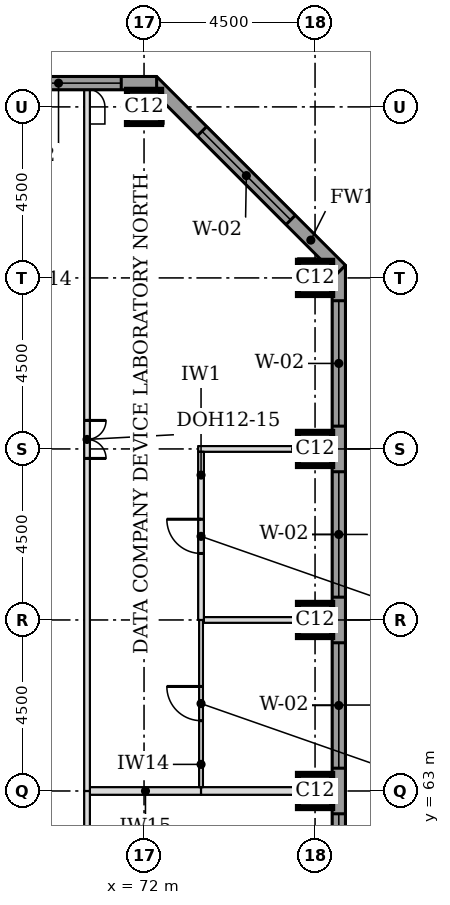
"""IFC4 building model, lengths in metres.
Left out: names, types, materials, properties, quantities, classifications, styles, units other than length and angle.
Written with IfcOpenShell. Run it as: python <this file> out.ifc"""

import sys

from ifc_helpers import new_model, si_unit, direction, frame, frame_2d, origin, origin_2d, place, context, subcontext, project, spatial, rectangle, extrude, element, fill, save


model = new_model("IFC4")
c1 = context("Model", 3, precision=1e-05, world=origin(), true_north=direction((0.0, 1.0)))
c2 = subcontext(c1, "Body", "Model", "MODEL_VIEW")
j1 = project(units=[si_unit("LENGTHUNIT", "METRE"), si_unit("PLANEANGLEUNIT", "RADIAN")], contexts=[c1])
p1 = place(None, origin())
s1 = spatial("IfcSite", under=j1, at=p1, CompositionType="ELEMENT")
p2 = place(p1, origin())
s2 = spatial("IfcBuilding", under=s1, at=p2, CompositionType="ELEMENT")
p3 = place(p2, frame((0.0, 0.0, 248.9)))
s3 = spatial("IfcBuildingStorey", under=s2, at=p3, CompositionType="ELEMENT", Elevation=248.9)
for number, where, z_axis, x_axis in (
    (1, (76.5, 63.0, 0.0), (0.0, 0.0, 1.0), (1.0, 0.0, 0.0)),
    (2, (76.5, 67.5, 0.0), (0.0, 0.0, 1.0), (1.0, 0.0, 0.0)),
    (3, (76.5, 72.0, 0.0), (0.0, 0.0, 1.0), (1.0, 0.0, 0.0)),
    (4, (76.5, 76.5, 0.0), (0.0, 0.0, 1.0), (1.0, 0.0, 0.0)),
    (5, (72.0, 81.0, 0.0), (0.0, 0.0, 1.0), (1.0, 0.0, 0.0)),
):
    element("IfcColumn", number, at=place(p3, frame(where, z_axis=z_axis, x_axis=x_axis)), inside=s3, PredefinedType="COLUMN", context=c2, shape_type="SweptSolid", body=[
        extrude(rectangle(XDim=0.9, YDim=0.9, at=origin_2d()), origin(), (0.0, 0.0, 1.0), 3.7),
    ])
p4 = place(p3, frame((77.125, 44.669, 0.0), z_axis=(0.0, 0.0, 1.0), x_axis=(0.0, 1.0, 0.0)))
e6 = element("IfcWall", 6, at=p4, inside=s3, PredefinedType="STANDARD", context=c2, shape_type="SweptSolid", body=[
    extrude(rectangle(XDim=32.163, YDim=0.35, at=frame_2d((16.081, 0.0))), origin(), (0.0, 0.0, 1.0), 3.525),
])
p5 = place(p4, frame((0.931, 0.0, 0.9)))
e7 = element("IfcOpeningElement", 7, at=p5, cuts=e6, PredefinedType="OPENING", context=c2, shape_type="SweptSolid", body=[
    extrude(rectangle(XDim=3.3, YDim=1.9, at=frame_2d((1.65, 0.95))), frame((0.0, 0.185, 0.0), z_axis=(0.0, -1.0, 0.0), x_axis=(1.0, 0.0, 0.0)), (0.0, 0.0, 1.0), 0.37),
])
p6 = place(p4, frame((5.431, 0.0, 0.9)))
e8 = element("IfcOpeningElement", 8, at=p6, cuts=e6, PredefinedType="OPENING", context=c2, shape_type="SweptSolid", body=[
    extrude(rectangle(XDim=3.3, YDim=1.9, at=frame_2d((1.65, 0.95))), frame((0.0, 0.185, 0.0), z_axis=(0.0, -1.0, 0.0), x_axis=(1.0, 0.0, 0.0)), (0.0, 0.0, 1.0), 0.37),
])
p7 = place(p4, frame((9.931, 0.0, 0.9)))
e9 = element("IfcOpeningElement", 9, at=p7, cuts=e6, PredefinedType="OPENING", context=c2, shape_type="SweptSolid", body=[
    extrude(rectangle(XDim=3.3, YDim=1.9, at=frame_2d((1.65, 0.95))), frame((0.0, 0.185, 0.0), z_axis=(0.0, -1.0, 0.0), x_axis=(1.0, 0.0, 0.0)), (0.0, 0.0, 1.0), 0.37),
])
p8 = place(p4, frame((14.431, 0.0, 0.9)))
e10 = element("IfcOpeningElement", 10, at=p8, cuts=e6, PredefinedType="OPENING", context=c2, shape_type="SweptSolid", body=[
    extrude(rectangle(XDim=3.3, YDim=1.9, at=frame_2d((1.65, 0.95))), frame((0.0, 0.185, 0.0), z_axis=(0.0, -1.0, 0.0), x_axis=(1.0, 0.0, 0.0)), (0.0, 0.0, 1.0), 0.37),
])
p9 = place(p4, frame((18.931, 0.0, 0.9)))
e11 = element("IfcOpeningElement", 11, at=p9, cuts=e6, PredefinedType="OPENING", context=c2, shape_type="SweptSolid", body=[
    extrude(rectangle(XDim=3.3, YDim=1.9, at=frame_2d((1.65, 0.95))), frame((0.0, 0.185, 0.0), z_axis=(0.0, -1.0, 0.0), x_axis=(1.0, 0.0, 0.0)), (0.0, 0.0, 1.0), 0.37),
])
p10 = place(p4, frame((23.431, 0.0, 0.9)))
e12 = element("IfcOpeningElement", 12, at=p10, cuts=e6, PredefinedType="OPENING", context=c2, shape_type="SweptSolid", body=[
    extrude(rectangle(XDim=3.3, YDim=1.9, at=frame_2d((1.65, 0.95))), frame((0.0, 0.185, 0.0), z_axis=(0.0, -1.0, 0.0), x_axis=(1.0, 0.0, 0.0)), (0.0, 0.0, 1.0), 0.37),
])
p11 = place(p4, frame((27.931, 0.0, 0.9)))
e13 = element("IfcOpeningElement", 13, at=p11, cuts=e6, PredefinedType="OPENING", context=c2, shape_type="SweptSolid", body=[
    extrude(rectangle(XDim=3.3, YDim=1.9, at=frame_2d((1.65, 0.95))), frame((0.0, 0.185, 0.0), z_axis=(0.0, -1.0, 0.0), x_axis=(1.0, 0.0, 0.0)), (0.0, 0.0, 1.0), 0.37),
])
p12 = place(p3, frame((77.176, 76.708, 0.0), z_axis=(0.0, 0.0, 1.0), x_axis=(-0.707106781187, 0.707106781187, 0.0)))
e14 = element("IfcWall", 14, at=p12, inside=s3, PredefinedType="STANDARD", context=c2, shape_type="SweptSolid", body=[
    extrude(rectangle(XDim=7.027, YDim=0.35, at=frame_2d((3.513, 0.0))), origin(), (0.0, 0.0, 1.0), 3.525),
])
p13 = place(p12, frame((1.863, 0.0, 0.9)))
e15 = element("IfcOpeningElement", 15, at=p13, cuts=e14, PredefinedType="OPENING", context=c2, shape_type="SweptSolid", body=[
    extrude(rectangle(XDim=3.3, YDim=1.9, at=frame_2d((1.65, 0.95))), frame((0.0, 0.185, 0.0), z_axis=(0.0, -1.0, 0.0), x_axis=(1.0, 0.0, 0.0)), (0.0, 0.0, 1.0), 0.37),
])
p14 = place(p3, frame((72.331, 81.625, 0.0), z_axis=(0.0, 0.0, 1.0), x_axis=(-1.0, 0.0, 0.0)))
e16 = element("IfcWall", 16, at=p14, inside=s3, PredefinedType="STANDARD", context=c2, shape_type="SweptSolid", body=[
    extrude(rectangle(XDim=32.163, YDim=0.35, at=frame_2d((16.081, 0.0))), origin(), (0.0, 0.0, 1.0), 3.525),
])
p15 = place(p14, frame((0.931, 0.0, 0.9)))
e17 = element("IfcOpeningElement", 17, at=p15, cuts=e16, PredefinedType="OPENING", context=c2, shape_type="SweptSolid", body=[
    extrude(rectangle(XDim=3.3, YDim=1.9, at=frame_2d((1.65, 0.95))), frame((0.0, 0.185, 0.0), z_axis=(0.0, -1.0, 0.0), x_axis=(1.0, 0.0, 0.0)), (0.0, 0.0, 1.0), 0.37),
])
p16 = place(p14, frame((5.431, 0.0, 0.9)))
e18 = element("IfcOpeningElement", 18, at=p16, cuts=e16, PredefinedType="OPENING", context=c2, shape_type="SweptSolid", body=[
    extrude(rectangle(XDim=3.3, YDim=1.9, at=frame_2d((1.65, 0.95))), frame((0.0, 0.185, 0.0), z_axis=(0.0, -1.0, 0.0), x_axis=(1.0, 0.0, 0.0)), (0.0, 0.0, 1.0), 0.37),
])
p17 = place(p14, frame((9.931, 0.0, 0.9)))
e19 = element("IfcOpeningElement", 19, at=p17, cuts=e16, PredefinedType="OPENING", context=c2, shape_type="SweptSolid", body=[
    extrude(rectangle(XDim=3.3, YDim=1.9, at=frame_2d((1.65, 0.95))), frame((0.0, 0.185, 0.0), z_axis=(0.0, -1.0, 0.0), x_axis=(1.0, 0.0, 0.0)), (0.0, 0.0, 1.0), 0.37),
])
p18 = place(p14, frame((14.431, 0.0, 0.9)))
e20 = element("IfcOpeningElement", 20, at=p18, cuts=e16, PredefinedType="OPENING", context=c2, shape_type="SweptSolid", body=[
    extrude(rectangle(XDim=3.3, YDim=1.9, at=frame_2d((1.65, 0.95))), frame((0.0, 0.185, 0.0), z_axis=(0.0, -1.0, 0.0), x_axis=(1.0, 0.0, 0.0)), (0.0, 0.0, 1.0), 0.37),
])
p19 = place(p14, frame((18.931, 0.0, 0.9)))
e21 = element("IfcOpeningElement", 21, at=p19, cuts=e16, PredefinedType="OPENING", context=c2, shape_type="SweptSolid", body=[
    extrude(rectangle(XDim=3.3, YDim=1.9, at=frame_2d((1.65, 0.95))), frame((0.0, 0.185, 0.0), z_axis=(0.0, -1.0, 0.0), x_axis=(1.0, 0.0, 0.0)), (0.0, 0.0, 1.0), 0.37),
])
p20 = place(p14, frame((23.431, 0.0, 0.9)))
e22 = element("IfcOpeningElement", 22, at=p20, cuts=e16, PredefinedType="OPENING", context=c2, shape_type="SweptSolid", body=[
    extrude(rectangle(XDim=3.3, YDim=1.9, at=frame_2d((1.65, 0.95))), frame((0.0, 0.185, 0.0), z_axis=(0.0, -1.0, 0.0), x_axis=(1.0, 0.0, 0.0)), (0.0, 0.0, 1.0), 0.37),
])
p21 = place(p14, frame((27.931, 0.0, 0.9)))
e23 = element("IfcOpeningElement", 23, at=p21, cuts=e16, PredefinedType="OPENING", context=c2, shape_type="SweptSolid", body=[
    extrude(rectangle(XDim=3.3, YDim=1.9, at=frame_2d((1.65, 0.95))), frame((0.0, 0.185, 0.0), z_axis=(0.0, -1.0, 0.0), x_axis=(1.0, 0.0, 0.0)), (0.0, 0.0, 1.0), 0.37),
])
p22 = place(p3, frame((70.575, 63.0, 0.0), z_axis=(0.0, 0.0, 1.0), x_axis=(1.0, 0.0, 0.0)))
e24 = element("IfcWall", 24, at=p22, inside=s3, PredefinedType="PARTITIONING", context=c2, shape_type="SweptSolid", body=[
    extrude(rectangle(XDim=2.925, YDim=0.2, at=frame_2d((1.462, 0.0))), origin(), (0.0, 0.0, 1.0), 3.55),
])
p23 = place(p3, frame((73.5, 63.0, 0.0), z_axis=(0.0, 0.0, 1.0), x_axis=(1.0, 0.0, 0.0)))
e25 = element("IfcWall", 25, at=p23, inside=s3, PredefinedType="PARTITIONING", context=c2, shape_type="SweptSolid", body=[
    extrude(rectangle(XDim=3.45, YDim=0.2, at=frame_2d((1.725, 0.0))), origin(), (0.0, 0.0, 1.0), 3.55),
])
p24 = place(p3, frame((73.575, 67.5, 0.0), z_axis=(0.0, 0.0, 1.0), x_axis=(1.0, 0.0, 0.0)))
e26 = element("IfcWall", 26, at=p24, inside=s3, PredefinedType="PARTITIONING", context=c2, shape_type="SweptSolid", body=[
    extrude(rectangle(XDim=3.375, YDim=0.15, at=frame_2d((1.688, 0.0))), origin(), (0.0, 0.0, 1.0), 3.55),
])
p25 = place(p3, frame((73.425, 72.0, 0.0), z_axis=(0.0, 0.0, 1.0), x_axis=(1.0, 0.0, 0.0)))
e27 = element("IfcWall", 27, at=p25, inside=s3, PredefinedType="PARTITIONING", context=c2, shape_type="SweptSolid", body=[
    extrude(rectangle(XDim=3.525, YDim=0.15, at=frame_2d((1.762, 0.0))), origin(), (0.0, 0.0, 1.0), 3.55),
])
p26 = place(p3, frame((70.5, 45.0, 0.0), z_axis=(0.0, 0.0, 1.0), x_axis=(0.0, 1.0, 0.0)))
e28 = element("IfcWall", 28, at=p26, inside=s3, PredefinedType="PARTITIONING", context=c2, shape_type="SweptSolid", body=[
    extrude(rectangle(XDim=18.0, YDim=0.15, at=frame_2d((9.0, 0.0))), origin(), (0.0, 0.0, 1.0), 3.55),
])
p27 = place(p26, frame((8.5, 0.0, 0.0)))
e29 = element("IfcOpeningElement", 29, at=p27, cuts=e28, PredefinedType="OPENING", context=c2, shape_type="SweptSolid", body=[
    extrude(rectangle(XDim=1.0, YDim=2.1, at=frame_2d((0.5, 1.05))), frame((0.0, 0.085, 0.0), z_axis=(0.0, -1.0, 0.0), x_axis=(1.0, 0.0, 0.0)), (0.0, 0.0, 1.0), 0.17),
])
p28 = place(p3, frame((70.5, 63.0, 0.0), z_axis=(0.0, 0.0, 1.0), x_axis=(0.0, 1.0, 0.0)))
e30 = element("IfcWall", 30, at=p28, inside=s3, PredefinedType="PARTITIONING", context=c2, shape_type="SweptSolid", body=[
    extrude(rectangle(XDim=18.45, YDim=0.15, at=frame_2d((9.225, 0.0))), origin(), (0.0, 0.0, 1.0), 3.55),
])
p29 = place(p28, frame((8.75, 0.0, 0.0)))
e31 = element("IfcOpeningElement", 31, at=p29, cuts=e30, PredefinedType="OPENING", context=c2, shape_type="SweptSolid", body=[
    extrude(rectangle(XDim=1.0, YDim=2.1, at=frame_2d((0.5, 1.05))), frame((0.0, 0.085, 0.0), z_axis=(0.0, -1.0, 0.0), x_axis=(1.0, 0.0, 0.0)), (0.0, 0.0, 1.0), 0.17),
])
p30 = place(p3, frame((73.5, 63.1, 0.0), z_axis=(0.0, 0.0, 1.0), x_axis=(0.0, 1.0, 0.0)))
e32 = element("IfcWall", 32, at=p30, inside=s3, PredefinedType="PARTITIONING", context=c2, shape_type="SweptSolid", body=[
    extrude(rectangle(XDim=4.4, YDim=0.1, at=frame_2d((2.2, 0.0))), origin(), (0.0, 0.0, 1.0), 3.55),
])
p31 = place(p30, frame((1.75, 0.0, 0.0)))
e33 = element("IfcOpeningElement", 33, at=p31, cuts=e32, PredefinedType="OPENING", context=c2, shape_type="SweptSolid", body=[
    extrude(rectangle(XDim=0.9, YDim=2.1, at=frame_2d((0.45, 1.05))), frame((0.0, 0.06, 0.0), z_axis=(0.0, -1.0, 0.0), x_axis=(1.0, 0.0, 0.0)), (0.0, 0.0, 1.0), 0.12),
])
p32 = place(p3, frame((73.5, 67.5, 0.0), z_axis=(0.0, 0.0, 1.0), x_axis=(0.0, 1.0, 0.0)))
e34 = element("IfcWall", 34, at=p32, inside=s3, PredefinedType="PARTITIONING", context=c2, shape_type="SweptSolid", body=[
    extrude(rectangle(XDim=4.425, YDim=0.15, at=frame_2d((2.212, 0.0))), origin(), (0.0, 0.0, 1.0), 3.55),
])
p33 = place(p32, frame((1.75, 0.0, 0.0)))
e35 = element("IfcOpeningElement", 35, at=p33, cuts=e34, PredefinedType="OPENING", context=c2, shape_type="SweptSolid", body=[
    extrude(rectangle(XDim=0.9, YDim=2.1, at=frame_2d((0.45, 1.05))), frame((0.0, 0.085, 0.0), z_axis=(0.0, -1.0, 0.0), x_axis=(1.0, 0.0, 0.0)), (0.0, 0.0, 1.0), 0.17),
])
p34 = place(p8, origin())
e36 = element("IfcWindow", 36, at=p34, inside=s3, PartitioningType="SINGLE_PANEL", PredefinedType="WINDOW", context=c2, shape_type="SweptSolid", body=[
    extrude(rectangle(XDim=3.3, YDim=1.9, at=frame_2d((1.65, 0.95))), frame((0.0, 0.085, 0.0), z_axis=(0.0, -1.0, 0.0), x_axis=(1.0, 0.0, 0.0)), (0.0, 0.0, 1.0), 0.06),
])
fill(e10, e36)
p35 = place(p9, origin())
e37 = element("IfcWindow", 37, at=p35, inside=s3, PartitioningType="SINGLE_PANEL", PredefinedType="WINDOW", context=c2, shape_type="SweptSolid", body=[
    extrude(rectangle(XDim=3.3, YDim=1.9, at=frame_2d((1.65, 0.95))), frame((0.0, 0.085, 0.0), z_axis=(0.0, -1.0, 0.0), x_axis=(1.0, 0.0, 0.0)), (0.0, 0.0, 1.0), 0.06),
])
fill(e11, e37)
p36 = place(p10, origin())
e38 = element("IfcWindow", 38, at=p36, inside=s3, PartitioningType="SINGLE_PANEL", PredefinedType="WINDOW", context=c2, shape_type="SweptSolid", body=[
    extrude(rectangle(XDim=3.3, YDim=1.9, at=frame_2d((1.65, 0.95))), frame((0.0, 0.085, 0.0), z_axis=(0.0, -1.0, 0.0), x_axis=(1.0, 0.0, 0.0)), (0.0, 0.0, 1.0), 0.06),
])
fill(e12, e38)
p37 = place(p11, origin())
e39 = element("IfcWindow", 39, at=p37, inside=s3, PartitioningType="SINGLE_PANEL", PredefinedType="WINDOW", context=c2, shape_type="SweptSolid", body=[
    extrude(rectangle(XDim=3.3, YDim=1.9, at=frame_2d((1.65, 0.95))), frame((0.0, 0.085, 0.0), z_axis=(0.0, -1.0, 0.0), x_axis=(1.0, 0.0, 0.0)), (0.0, 0.0, 1.0), 0.06),
])
fill(e13, e39)
p38 = place(p13, origin())
e40 = element("IfcWindow", 40, at=p38, inside=s3, PartitioningType="SINGLE_PANEL", PredefinedType="WINDOW", context=c2, shape_type="SweptSolid", body=[
    extrude(rectangle(XDim=3.3, YDim=1.9, at=frame_2d((1.65, 0.95))), frame((0.0, 0.085, 0.0), z_axis=(0.0, -1.0, 0.0), x_axis=(1.0, 0.0, 0.0)), (0.0, 0.0, 1.0), 0.06),
])
fill(e15, e40)
p39 = place(p15, origin())
e41 = element("IfcWindow", 41, at=p39, inside=s3, PartitioningType="SINGLE_PANEL", PredefinedType="WINDOW", context=c2, shape_type="SweptSolid", body=[
    extrude(rectangle(XDim=3.3, YDim=1.9, at=frame_2d((1.65, 0.95))), frame((0.0, 0.085, 0.0), z_axis=(0.0, -1.0, 0.0), x_axis=(1.0, 0.0, 0.0)), (0.0, 0.0, 1.0), 0.06),
])
fill(e17, e41)
p40 = place(p29, frame((1.0, 0.0, 0.0), z_axis=(0.0, 0.0, 1.0), x_axis=(-1.0, 0.0, 0.0)))
e42 = element("IfcDoor", 42, at=p40, inside=s3, OperationType="DOUBLE_DOOR_SINGLE_SWING", PredefinedType="DOOR", context=c2, shape_type="SweptSolid", body=[
    extrude(rectangle(XDim=1.0, YDim=2.1, at=frame_2d((0.5, 1.05))), frame((0.0, 0.025, 0.0), z_axis=(0.0, -1.0, 0.0), x_axis=(1.0, 0.0, 0.0)), (0.0, 0.0, 1.0), 0.05),
])
fill(e31, e42)
p41 = place(p31, origin())
e43 = element("IfcDoor", 43, at=p41, inside=s3, OperationType="SINGLE_SWING_RIGHT", PredefinedType="DOOR", context=c2, shape_type="SweptSolid", body=[
    extrude(rectangle(XDim=0.9, YDim=2.1, at=frame_2d((0.45, 1.05))), frame((0.0, 0.025, 0.0), z_axis=(0.0, -1.0, 0.0), x_axis=(1.0, 0.0, 0.0)), (0.0, 0.0, 1.0), 0.05),
])
fill(e33, e43)
p42 = place(p33, origin())
e44 = element("IfcDoor", 44, at=p42, inside=s3, OperationType="SINGLE_SWING_RIGHT", PredefinedType="DOOR", context=c2, shape_type="SweptSolid", body=[
    extrude(rectangle(XDim=0.9, YDim=2.1, at=frame_2d((0.45, 1.05))), frame((0.0, 0.025, 0.0), z_axis=(0.0, -1.0, 0.0), x_axis=(1.0, 0.0, 0.0)), (0.0, 0.0, 1.0), 0.05),
])
fill(e35, e44)
save(model, sys.argv[1])
